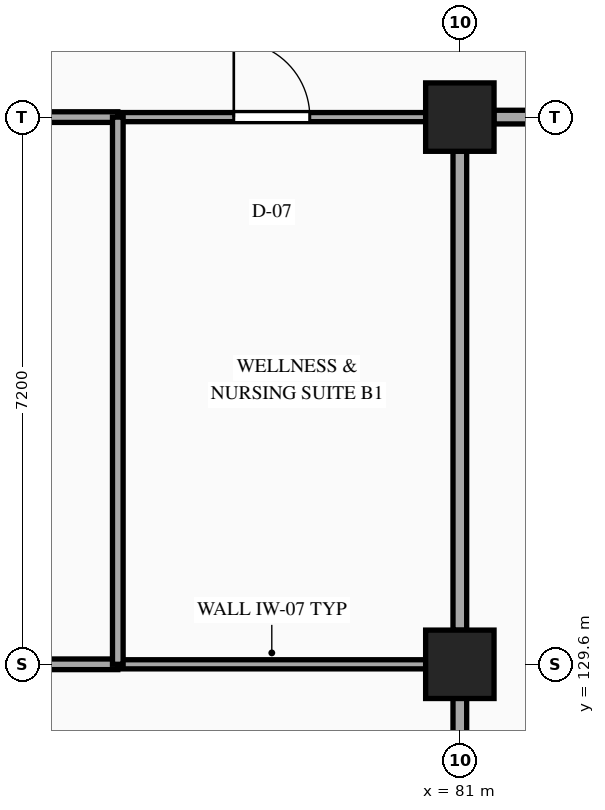
"""IFC4 building model, lengths in metres.
Left out: names, types, materials, properties, quantities, classifications, styles, units other than length and angle.
Written with IfcOpenShell. Run it as: python <this file> out.ifc"""

import sys

from ifc_helpers import new_model, si_unit, direction, frame, frame_2d, origin, origin_2d, place, context, subcontext, project, spatial, rectangle, extrude, element, fill, save


model = new_model("IFC4")
c1 = context("Model", 3, precision=1e-05, world=origin(), true_north=direction((0.0, 1.0)))
c2 = subcontext(c1, "Body", "Model", "MODEL_VIEW")
j1 = project(units=[si_unit("LENGTHUNIT", "METRE"), si_unit("PLANEANGLEUNIT", "RADIAN")], contexts=[c1])
p1 = place(None, origin())
s1 = spatial("IfcSite", under=j1, at=p1, CompositionType="ELEMENT")
p2 = place(p1, origin())
s2 = spatial("IfcBuilding", under=s1, at=p2, CompositionType="ELEMENT")
p3 = place(p2, frame((0.0, 0.0, -5.4)))
s3 = spatial("IfcBuildingStorey", under=s2, at=p3, CompositionType="ELEMENT", Elevation=-5.4)
for number, where, z_axis, x_axis in (
    (1, (81.0, 129.6, 0.0), (0.0, 0.0, 1.0), (1.0, 0.0, 0.0)),
    (2, (81.0, 136.8, 0.0), (0.0, 0.0, 1.0), (1.0, 0.0, 0.0)),
):
    element("IfcColumn", number, at=place(p3, frame(where, z_axis=z_axis, x_axis=x_axis)), inside=s3, PredefinedType="COLUMN", context=c2, shape_type="SweptSolid", body=[
        extrude(rectangle(XDim=0.9, YDim=0.9, at=origin_2d()), origin(), (0.0, 0.0, 1.0), 5.4),
    ])
p4 = place(p3, frame((72.448, 129.6, 0.0), z_axis=(0.0, 0.0, 1.0), x_axis=(1.0, 0.0, 0.0)))
e3 = element("IfcWall", 3, at=p4, inside=s3, PredefinedType="PARTITIONING", context=c2, shape_type="SweptSolid", body=[
    extrude(rectangle(XDim=4.052, YDim=0.14, at=frame_2d((2.026, 0.0))), origin(), (0.0, 0.0, 1.0), 4.384),
])
p5 = place(p3, frame((76.5, 129.6, 0.0), z_axis=(0.0, 0.0, 1.0), x_axis=(1.0, 0.0, 0.0)))
e4 = element("IfcWall", 4, at=p5, inside=s3, PredefinedType="PARTITIONING", context=c2, shape_type="SweptSolid", body=[
    extrude(rectangle(XDim=4.052, YDim=0.12, at=frame_2d((2.026, 0.0))), origin(), (0.0, 0.0, 1.0), 4.384),
])
p6 = place(p3, frame((72.448, 136.8, 0.0), z_axis=(0.0, 0.0, 1.0), x_axis=(1.0, 0.0, 0.0)))
e5 = element("IfcWall", 5, at=p6, inside=s3, PredefinedType="PARTITIONING", context=c2, shape_type="SweptSolid", body=[
    extrude(rectangle(XDim=4.052, YDim=0.14, at=frame_2d((2.026, 0.0))), origin(), (0.0, 0.0, 1.0), 4.384),
])
p7 = place(p6, frame((1.551, 0.0, 0.0)))
e6 = element("IfcOpeningElement", 6, at=p7, cuts=e5, PredefinedType="OPENING", context=c2, shape_type="SweptSolid", body=[
    extrude(rectangle(XDim=0.95, YDim=2.1, at=frame_2d((0.475, 1.05))), frame((0.0, 0.08, 0.0), z_axis=(0.0, -1.0, 0.0), x_axis=(1.0, 0.0, 0.0)), (0.0, 0.0, 1.0), 0.16),
])
p8 = place(p3, frame((76.5, 136.8, 0.0), z_axis=(0.0, 0.0, 1.0), x_axis=(1.0, 0.0, 0.0)))
e7 = element("IfcWall", 7, at=p8, inside=s3, PredefinedType="PARTITIONING", context=c2, shape_type="SweptSolid", body=[
    extrude(rectangle(XDim=4.052, YDim=0.12, at=frame_2d((2.026, 0.0))), origin(), (0.0, 0.0, 1.0), 4.384),
])
p9 = place(p8, frame((1.526, 0.0, 0.0)))
e8 = element("IfcOpeningElement", 8, at=p9, cuts=e7, PredefinedType="OPENING", context=c2, shape_type="SweptSolid", body=[
    extrude(rectangle(XDim=1.0, YDim=2.15, at=frame_2d((0.5, 1.075))), frame((0.0, 0.07, 0.0), z_axis=(0.0, -1.0, 0.0), x_axis=(1.0, 0.0, 0.0)), (0.0, 0.0, 1.0), 0.14),
])
p10 = place(p3, frame((81.448, 136.8, 0.0), z_axis=(0.0, 0.0, 1.0), x_axis=(1.0, 0.0, 0.0)))
e9 = element("IfcWall", 9, at=p10, inside=s3, PredefinedType="PARTITIONING", context=c2, shape_type="SweptSolid", body=[
    extrude(rectangle(XDim=8.104, YDim=0.18, at=frame_2d((4.052, 0.0))), origin(), (0.0, 0.0, 1.0), 4.384),
])
p11 = place(p10, frame((3.302, 0.0, 0.0)))
e10 = element("IfcOpeningElement", 10, at=p11, cuts=e9, PredefinedType="OPENING", context=c2, shape_type="SweptSolid", body=[
    extrude(rectangle(XDim=1.5, YDim=2.25, at=frame_2d((0.75, 1.125))), frame((0.0, 0.1, 0.0), z_axis=(0.0, -1.0, 0.0), x_axis=(1.0, 0.0, 0.0)), (0.0, 0.0, 1.0), 0.2),
])
p12 = place(p3, frame((76.5, 129.6, 0.0), z_axis=(0.0, 0.0, 1.0), x_axis=(0.0, 1.0, 0.0)))
e11 = element("IfcWall", 11, at=p12, inside=s3, PredefinedType="PARTITIONING", context=c2, shape_type="SweptSolid", body=[
    extrude(rectangle(XDim=7.2, YDim=0.14, at=frame_2d((3.6, 0.0))), origin(), (0.0, 0.0, 1.0), 4.384),
])
p13 = place(p3, frame((81.0, 122.848, 0.0), z_axis=(0.0, 0.0, 1.0), x_axis=(0.0, 1.0, 0.0)))
e12 = element("IfcWall", 12, at=p13, inside=s3, PredefinedType="PARTITIONING", context=c2, shape_type="SweptSolid", body=[
    extrude(rectangle(XDim=6.304, YDim=0.18, at=frame_2d((3.152, 0.0))), origin(), (0.0, 0.0, 1.0), 4.397),
])
p14 = place(p3, frame((81.0, 130.048, 0.0), z_axis=(0.0, 0.0, 1.0), x_axis=(0.0, 1.0, 0.0)))
e13 = element("IfcWall", 13, at=p14, inside=s3, PredefinedType="PARTITIONING", context=c2, shape_type="SweptSolid", body=[
    extrude(rectangle(XDim=6.304, YDim=0.18, at=frame_2d((3.152, 0.0))), origin(), (0.0, 0.0, 1.0), 4.397),
])
p15 = place(p9, origin())
e14 = element("IfcDoor", 14, at=p15, inside=s3, OperationType="SINGLE_SWING_LEFT", PredefinedType="DOOR", context=c2, shape_type="SweptSolid", body=[
    extrude(rectangle(XDim=1.0, YDim=2.15, at=frame_2d((0.5, 1.075))), frame((0.0, 0.025, 0.0), z_axis=(0.0, -1.0, 0.0), x_axis=(1.0, 0.0, 0.0)), (0.0, 0.0, 1.0), 0.05),
])
fill(e8, e14)
save(model, sys.argv[1])
